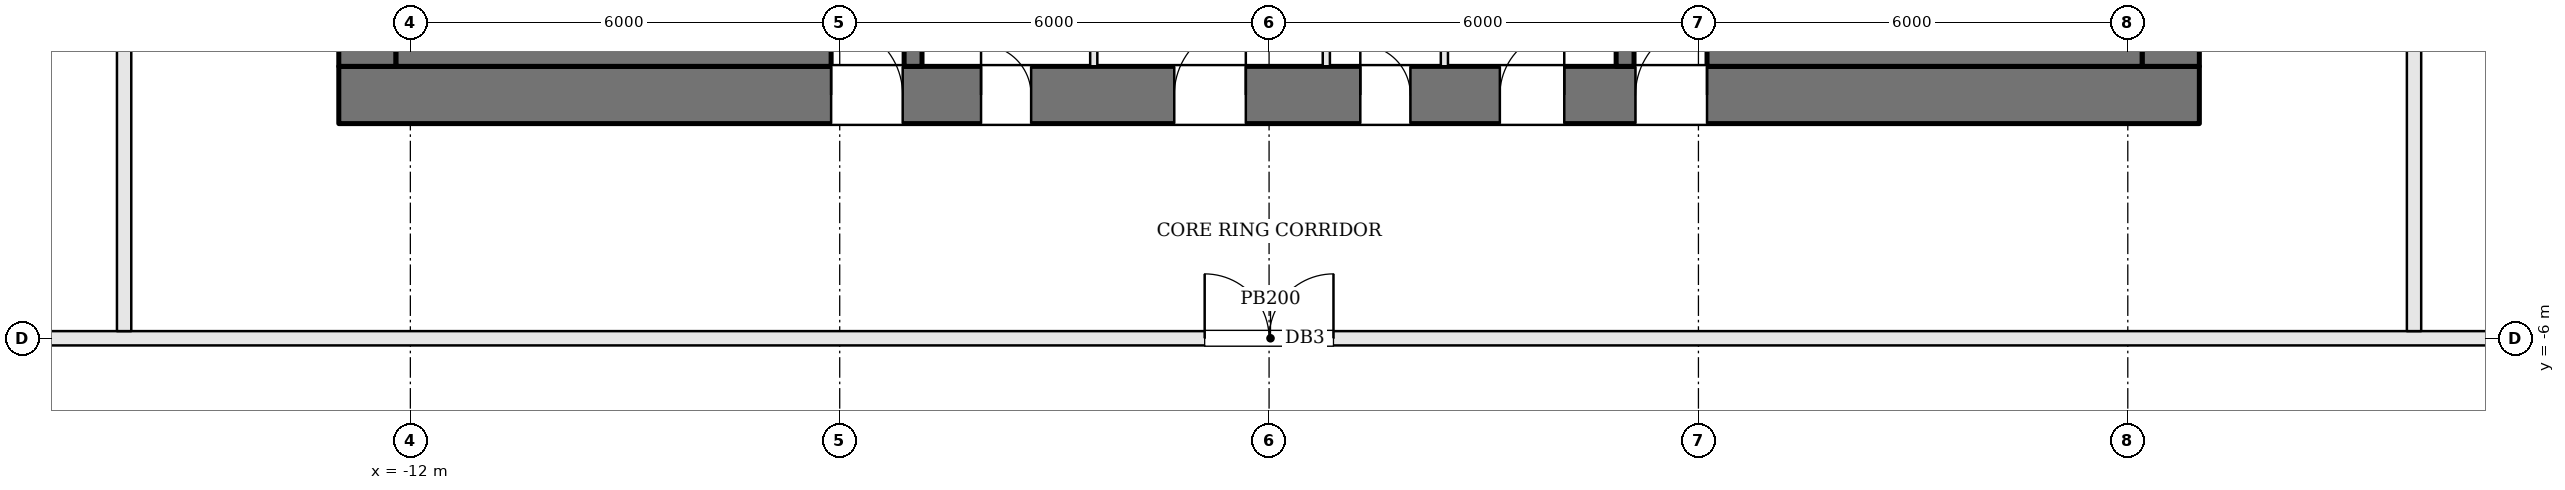
"""IFC4 building model, lengths in metres.
Left out: names, types, materials, properties, quantities, classifications, styles, units other than length and angle.
Written with IfcOpenShell. Run it as: python <this file> out.ifc"""

import sys

from ifc_helpers import new_model, si_unit, direction, frame, frame_2d, origin, place, context, subcontext, project, spatial, rectangle, extrude, element, fill, save


model = new_model("IFC4")
c1 = context("Model", 3, precision=1e-05, world=origin(), true_north=direction((0.0, 1.0)))
c2 = subcontext(c1, "Body", "Model", "MODEL_VIEW")
j1 = project(units=[si_unit("LENGTHUNIT", "METRE"), si_unit("PLANEANGLEUNIT", "RADIAN")], contexts=[c1])
p1 = place(None, origin())
s1 = spatial("IfcSite", under=j1, at=p1, CompositionType="ELEMENT")
p2 = place(p1, origin())
s2 = spatial("IfcBuilding", under=s1, at=p2, CompositionType="ELEMENT")
p3 = place(p2, frame((0.0, 0.0, 193.5)))
s3 = spatial("IfcBuildingStorey", under=s2, at=p3, CompositionType="ELEMENT", Elevation=193.5)
p4 = place(p3, frame((-13.0, -2.6, 0.0), z_axis=(0.0, 0.0, 1.0), x_axis=(1.0, 0.0, 0.0)))
e1 = element("IfcWall", 1, at=p4, inside=s3, PredefinedType="SHEAR", context=c2, shape_type="SweptSolid", body=[
    extrude(rectangle(XDim=26.0, YDim=0.8, at=frame_2d((13.0, 0.0))), origin(), (0.0, 0.0, 1.0), 3.9),
])
p5 = place(p4, frame((8.975, 0.0, 0.0)))
e2 = element("IfcOpeningElement", 2, at=p5, cuts=e1, PredefinedType="OPENING", context=c2, shape_type="SweptSolid", body=[
    extrude(rectangle(XDim=0.7, YDim=2.1, at=frame_2d((0.35, 1.05))), frame((0.0, 0.41, 0.0), z_axis=(0.0, -1.0, 0.0), x_axis=(1.0, 0.0, 0.0)), (0.0, 0.0, 1.0), 0.82),
])
p6 = place(p4, frame((11.675, 0.0, 0.0)))
e3 = element("IfcOpeningElement", 3, at=p6, cuts=e1, PredefinedType="OPENING", context=c2, shape_type="SweptSolid", body=[
    extrude(rectangle(XDim=1.0, YDim=2.1, at=frame_2d((0.5, 1.05))), frame((0.0, 0.41, 0.0), z_axis=(0.0, -1.0, 0.0), x_axis=(1.0, 0.0, 0.0)), (0.0, 0.0, 1.0), 0.82),
])
p7 = place(p4, frame((14.275, 0.0, 0.0)))
e4 = element("IfcOpeningElement", 4, at=p7, cuts=e1, PredefinedType="OPENING", context=c2, shape_type="SweptSolid", body=[
    extrude(rectangle(XDim=0.7, YDim=2.1, at=frame_2d((0.35, 1.05))), frame((0.0, 0.41, 0.0), z_axis=(0.0, -1.0, 0.0), x_axis=(1.0, 0.0, 0.0)), (0.0, 0.0, 1.0), 0.82),
])
p8 = place(p4, frame((16.225, 0.0, 0.0)))
e5 = element("IfcOpeningElement", 5, at=p8, cuts=e1, PredefinedType="OPENING", context=c2, shape_type="SweptSolid", body=[
    extrude(rectangle(XDim=0.9, YDim=2.1, at=frame_2d((0.45, 1.05))), frame((0.0, 0.41, 0.0), z_axis=(0.0, -1.0, 0.0), x_axis=(1.0, 0.0, 0.0)), (0.0, 0.0, 1.0), 0.82),
])
p9 = place(p4, frame((6.88, 0.0, 0.0)))
e6 = element("IfcOpeningElement", 6, at=p9, cuts=e1, PredefinedType="OPENING", context=c2, shape_type="SweptSolid", body=[
    extrude(rectangle(XDim=1.0, YDim=2.1, at=frame_2d((0.5, 1.05))), frame((0.0, 0.41, 0.0), z_axis=(0.0, -1.0, 0.0), x_axis=(1.0, 0.0, 0.0)), (0.0, 0.0, 1.0), 0.82),
])
p10 = place(p4, frame((18.12, 0.0, 0.0)))
e7 = element("IfcOpeningElement", 7, at=p10, cuts=e1, PredefinedType="OPENING", context=c2, shape_type="SweptSolid", body=[
    extrude(rectangle(XDim=1.0, YDim=2.1, at=frame_2d((0.5, 1.05))), frame((0.0, 0.41, 0.0), z_axis=(0.0, -1.0, 0.0), x_axis=(1.0, 0.0, 0.0)), (0.0, 0.0, 1.0), 0.82),
])
p11 = place(p3, frame((12.6, -2.2, 0.0), z_axis=(0.0, 0.0, 1.0), x_axis=(0.0, 1.0, 0.0)))
e8 = element("IfcWall", 8, at=p11, inside=s3, PredefinedType="SHEAR", context=c2, shape_type="SweptSolid", body=[
    extrude(rectangle(XDim=13.4, YDim=0.8, at=frame_2d((6.7, 0.0))), origin(), (0.0, 0.0, 1.0), 3.9),
])
p12 = place(p11, frame((7.4, 0.0, 0.0)))
e9 = element("IfcOpeningElement", 9, at=p12, cuts=e8, PredefinedType="OPENING", context=c2, shape_type="SweptSolid", body=[
    extrude(rectangle(XDim=1.8, YDim=2.1, at=frame_2d((0.9, 1.05))), frame((0.0, 0.41, 0.0), z_axis=(0.0, -1.0, 0.0), x_axis=(1.0, 0.0, 0.0)), (0.0, 0.0, 1.0), 0.82),
])
p13 = place(p3, frame((-12.6, -2.2, 0.0), z_axis=(0.0, 0.0, 1.0), x_axis=(0.0, 1.0, 0.0)))
e10 = element("IfcWall", 10, at=p13, inside=s3, PredefinedType="SHEAR", context=c2, shape_type="SweptSolid", body=[
    extrude(rectangle(XDim=13.4, YDim=0.8, at=frame_2d((6.7, 0.0))), origin(), (0.0, 0.0, 1.0), 3.9),
])
p14 = place(p13, frame((4.2, 0.0, 0.0)))
e11 = element("IfcOpeningElement", 11, at=p14, cuts=e10, PredefinedType="OPENING", context=c2, shape_type="SweptSolid", body=[
    extrude(rectangle(XDim=1.8, YDim=2.1, at=frame_2d((0.9, 1.05))), frame((0.0, 0.41, 0.0), z_axis=(0.0, -1.0, 0.0), x_axis=(1.0, 0.0, 0.0)), (0.0, 0.0, 1.0), 0.82),
])
p15 = place(p3, frame((-4.975, -2.2, 0.0), z_axis=(0.0, 0.0, 1.0), x_axis=(0.0, 1.0, 0.0)))
e12 = element("IfcWall", 12, at=p15, inside=s3, PredefinedType="SOLIDWALL", context=c2, shape_type="SweptSolid", body=[
    extrude(rectangle(XDim=13.4, YDim=0.25, at=frame_2d((6.7, 0.0))), origin(), (0.0, 0.0, 1.0), 3.7),
])
p16 = place(p15, frame((5.25, 0.0, 0.0)))
e13 = element("IfcOpeningElement", 13, at=p16, cuts=e12, PredefinedType="OPENING", context=c2, shape_type="SweptSolid", body=[
    extrude(rectangle(XDim=1.2, YDim=2.1, at=frame_2d((0.6, 1.05))), frame((0.0, 0.135, 0.0), z_axis=(0.0, -1.0, 0.0), x_axis=(1.0, 0.0, 0.0)), (0.0, 0.0, 1.0), 0.27),
])
p17 = place(p3, frame((4.975, 11.2, 0.0), z_axis=(0.0, 0.0, 1.0), x_axis=(0.0, -1.0, 0.0)))
e14 = element("IfcWall", 14, at=p17, inside=s3, PredefinedType="SOLIDWALL", context=c2, shape_type="SweptSolid", body=[
    extrude(rectangle(XDim=13.4, YDim=0.25, at=frame_2d((6.7, 0.0))), origin(), (0.0, 0.0, 1.0), 3.7),
])
p18 = place(p17, frame((5.25, 0.0, 0.0)))
e15 = element("IfcOpeningElement", 15, at=p18, cuts=e14, PredefinedType="OPENING", context=c2, shape_type="SweptSolid", body=[
    extrude(rectangle(XDim=1.2, YDim=2.1, at=frame_2d((0.6, 1.05))), frame((0.0, 0.135, 0.0), z_axis=(0.0, -1.0, 0.0), x_axis=(1.0, 0.0, 0.0)), (0.0, 0.0, 1.0), 0.27),
])
for number, where, z_axis, x_axis in (
    (16, (-12.2, -1.9, 0.0), (0.0, 0.0, 1.0), (1.0, 0.0, 0.0)),
    (17, (12.2, -1.9, 0.0), (0.0, 0.0, 1.0), (-1.0, 0.0, 0.0)),
):
    element("IfcWall", number, at=place(p3, frame(where, z_axis=z_axis, x_axis=x_axis)), inside=s3, PredefinedType="SOLIDWALL", context=c2, shape_type="SweptSolid", body=[
        extrude(rectangle(XDim=6.08, YDim=0.6, at=frame_2d((3.04, 0.0))), origin(), (0.0, 0.0, 1.0), 3.7),
    ])
for number, where, z_axis, x_axis in (
    (18, (-2.45, -2.2, 0.0), (0.0, 0.0, 1.0), (0.0, 1.0, 0.0)),
    (19, (0.8, -2.2, 0.0), (0.0, 0.0, 1.0), (0.0, 1.0, 0.0)),
    (20, (2.45, -2.2, 0.0), (0.0, 0.0, 1.0), (0.0, 1.0, 0.0)),
):
    element("IfcWall", number, at=place(p3, frame(where, z_axis=z_axis, x_axis=x_axis)), inside=s3, PredefinedType="PARTITIONING", context=c2, shape_type="SweptSolid", body=[
        extrude(rectangle(XDim=2.6, YDim=0.1, at=frame_2d((1.3, 0.0))), origin(), (0.0, 0.0, 1.0), 3.7),
    ])
p19 = place(p3, frame((-21.998, -6.0, 0.0), z_axis=(0.0, 0.0, 1.0), x_axis=(1.0, 0.0, 0.0)))
e21 = element("IfcWall", 21, at=p19, inside=s3, PredefinedType="PARTITIONING", context=c2, shape_type="SweptSolid", body=[
    extrude(rectangle(XDim=44.036, YDim=0.2, at=frame_2d((22.018, 0.0))), origin(), (0.0, 0.0, 1.0), 3.7),
])
p20 = place(p19, frame((21.098, 0.0, 0.0)))
e22 = element("IfcOpeningElement", 22, at=p20, cuts=e21, PredefinedType="OPENING", context=c2, shape_type="SweptSolid", body=[
    extrude(rectangle(XDim=1.8, YDim=2.1, at=frame_2d((0.9, 1.05))), frame((0.0, 0.11, 0.0), z_axis=(0.0, -1.0, 0.0), x_axis=(1.0, 0.0, 0.0)), (0.0, 0.0, 1.0), 0.22),
])
p21 = place(p3, frame((-16.0, 13.047, 0.0), z_axis=(0.0, 0.0, 1.0), x_axis=(0.0, -1.0, 0.0)))
e23 = element("IfcWall", 23, at=p21, inside=s3, PredefinedType="PARTITIONING", context=c2, shape_type="SweptSolid", body=[
    extrude(rectangle(XDim=18.947, YDim=0.2, at=frame_2d((9.474, 0.0))), origin(), (0.0, 0.0, 1.0), 3.7),
])
p22 = place(p21, frame((7.647, 0.0, 0.0)))
e24 = element("IfcOpeningElement", 24, at=p22, cuts=e23, PredefinedType="OPENING", context=c2, shape_type="SweptSolid", body=[
    extrude(rectangle(XDim=1.8, YDim=2.1, at=frame_2d((0.9, 1.05))), frame((0.0, 0.11, 0.0), z_axis=(0.0, -1.0, 0.0), x_axis=(1.0, 0.0, 0.0)), (0.0, 0.0, 1.0), 0.22),
])
p23 = place(p3, frame((16.0, -5.9, 0.0), z_axis=(0.0, 0.0, 1.0), x_axis=(0.0, 1.0, 0.0)))
e25 = element("IfcWall", 25, at=p23, inside=s3, PredefinedType="PARTITIONING", context=c2, shape_type="SweptSolid", body=[
    extrude(rectangle(XDim=18.952, YDim=0.2, at=frame_2d((9.476, 0.0))), origin(), (0.0, 0.0, 1.0), 3.7),
])
p24 = place(p23, frame((9.5, 0.0, 0.0)))
e26 = element("IfcOpeningElement", 26, at=p24, cuts=e25, PredefinedType="OPENING", context=c2, shape_type="SweptSolid", body=[
    extrude(rectangle(XDim=1.8, YDim=2.1, at=frame_2d((0.9, 1.05))), frame((0.0, 0.11, 0.0), z_axis=(0.0, -1.0, 0.0), x_axis=(1.0, 0.0, 0.0)), (0.0, 0.0, 1.0), 0.22),
])
p25 = place(p5, origin())
e27 = element("IfcDoor", 27, at=p25, inside=s3, OperationType="SINGLE_SWING_LEFT", PredefinedType="DOOR", context=c2, shape_type="SweptSolid", body=[
    extrude(rectangle(XDim=0.7, YDim=2.1, at=frame_2d((0.35, 1.05))), frame((0.0, 0.025, 0.0), z_axis=(0.0, -1.0, 0.0), x_axis=(1.0, 0.0, 0.0)), (0.0, 0.0, 1.0), 0.05),
])
fill(e2, e27)
p26 = place(p6, origin())
e28 = element("IfcDoor", 28, at=p26, inside=s3, OperationType="SINGLE_SWING_RIGHT", PredefinedType="DOOR", context=c2, shape_type="SweptSolid", body=[
    extrude(rectangle(XDim=1.0, YDim=2.1, at=frame_2d((0.5, 1.05))), frame((0.0, 0.025, 0.0), z_axis=(0.0, -1.0, 0.0), x_axis=(1.0, 0.0, 0.0)), (0.0, 0.0, 1.0), 0.05),
])
fill(e3, e28)
p27 = place(p7, origin())
e29 = element("IfcDoor", 29, at=p27, inside=s3, OperationType="SINGLE_SWING_LEFT", PredefinedType="DOOR", context=c2, shape_type="SweptSolid", body=[
    extrude(rectangle(XDim=0.7, YDim=2.1, at=frame_2d((0.35, 1.05))), frame((0.0, 0.025, 0.0), z_axis=(0.0, -1.0, 0.0), x_axis=(1.0, 0.0, 0.0)), (0.0, 0.0, 1.0), 0.05),
])
fill(e4, e29)
p28 = place(p8, origin())
e30 = element("IfcDoor", 30, at=p28, inside=s3, OperationType="SINGLE_SWING_RIGHT", PredefinedType="DOOR", context=c2, shape_type="SweptSolid", body=[
    extrude(rectangle(XDim=0.9, YDim=2.1, at=frame_2d((0.45, 1.05))), frame((0.0, 0.025, 0.0), z_axis=(0.0, -1.0, 0.0), x_axis=(1.0, 0.0, 0.0)), (0.0, 0.0, 1.0), 0.05),
])
fill(e5, e30)
p29 = place(p9, origin())
e31 = element("IfcDoor", 31, at=p29, inside=s3, OperationType="SINGLE_SWING_LEFT", PredefinedType="DOOR", context=c2, shape_type="SweptSolid", body=[
    extrude(rectangle(XDim=1.0, YDim=2.1, at=frame_2d((0.5, 1.05))), frame((0.0, 0.025, 0.0), z_axis=(0.0, -1.0, 0.0), x_axis=(1.0, 0.0, 0.0)), (0.0, 0.0, 1.0), 0.05),
])
fill(e6, e31)
p30 = place(p10, origin())
e32 = element("IfcDoor", 32, at=p30, inside=s3, OperationType="SINGLE_SWING_RIGHT", PredefinedType="DOOR", context=c2, shape_type="SweptSolid", body=[
    extrude(rectangle(XDim=1.0, YDim=2.1, at=frame_2d((0.5, 1.05))), frame((0.0, 0.025, 0.0), z_axis=(0.0, -1.0, 0.0), x_axis=(1.0, 0.0, 0.0)), (0.0, 0.0, 1.0), 0.05),
])
fill(e7, e32)
p31 = place(p20, origin())
e33 = element("IfcDoor", 33, at=p31, inside=s3, OperationType="DOUBLE_DOOR_SINGLE_SWING", PredefinedType="DOOR", context=c2, shape_type="SweptSolid", body=[
    extrude(rectangle(XDim=1.8, YDim=2.1, at=frame_2d((0.9, 1.05))), frame((0.0, 0.025, 0.0), z_axis=(0.0, -1.0, 0.0), x_axis=(1.0, 0.0, 0.0)), (0.0, 0.0, 1.0), 0.05),
])
fill(e22, e33)
save(model, sys.argv[1])
